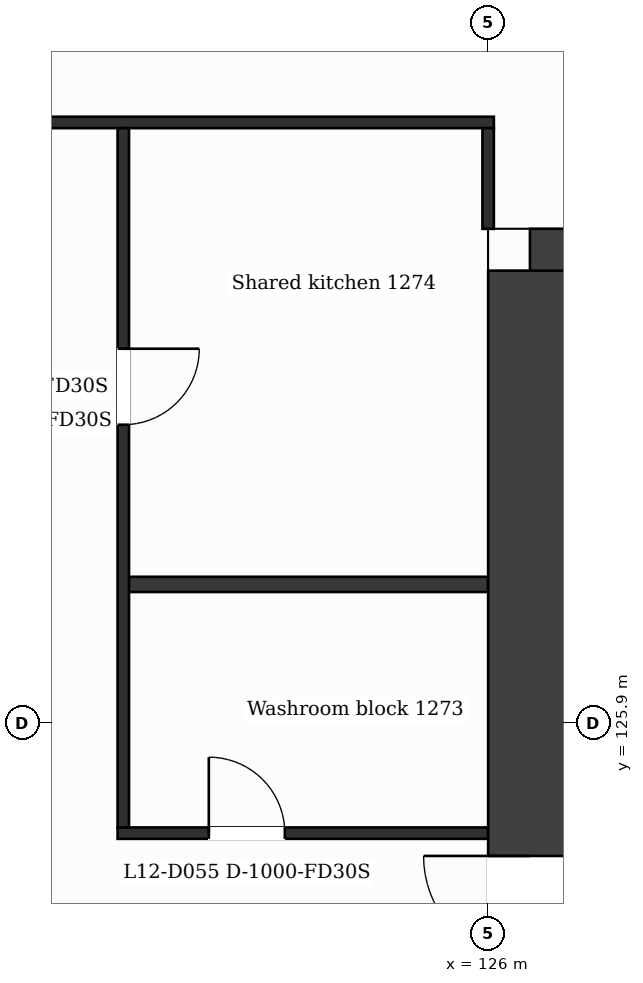
"""IFC4 building model, lengths in metres.
Left out: names, types, materials, properties, quantities, classifications, styles, units other than length and angle.
Written with IfcOpenShell. Run it as: python <this file> out.ifc"""

import sys

from ifc_helpers import new_model, si_unit, direction, frame, frame_2d, origin, place, context, subcontext, project, spatial, rectangle, extrude, element, fill, save


model = new_model("IFC4")
c1 = context("Model", 3, precision=1e-05, world=origin(), true_north=direction((0.0, 1.0)))
c2 = subcontext(c1, "Body", "Model", "MODEL_VIEW")
j1 = project(units=[si_unit("LENGTHUNIT", "METRE"), si_unit("PLANEANGLEUNIT", "RADIAN")], contexts=[c1])
p1 = place(None, origin())
s1 = spatial("IfcSite", under=j1, at=p1, CompositionType="ELEMENT")
p2 = place(p1, origin())
s2 = spatial("IfcBuilding", under=s1, at=p2, CompositionType="ELEMENT")
p3 = place(p2, frame((0.0, 0.0, 60.0)))
s3 = spatial("IfcBuildingStorey", under=s2, at=p3, CompositionType="ELEMENT", Elevation=60.0)
p4 = place(p3, frame((126.55, 131.85, 0.0), z_axis=(0.0, 0.0, 1.0), x_axis=(1.0, 0.0, 0.0)))
e1 = element("IfcWall", 1, at=p4, inside=s3, PredefinedType="SHEAR", context=c2, shape_type="SweptSolid", body=[
    extrude(rectangle(XDim=11.138, YDim=1.1, at=frame_2d((5.569, 0.0))), origin(), (0.0, 0.0, 1.0), 3.5),
])
p5 = place(p4, frame((3.386, 0.0, 0.0)))
e2 = element("IfcOpeningElement", 2, at=p5, cuts=e1, PredefinedType="OPENING", context=c2, shape_type="SweptSolid", body=[
    extrude(rectangle(XDim=1.2, YDim=2.1, at=frame_2d((0.6, 1.05))), frame((0.0, 0.56, 0.0), z_axis=(0.0, -1.0, 0.0), x_axis=(1.0, 0.0, 0.0)), (0.0, 0.0, 1.0), 1.12),
])
p6 = place(p3, frame((126.55, 110.95, 0.0), z_axis=(0.0, 0.0, 1.0), x_axis=(0.0, 1.0, 0.0)))
e3 = element("IfcWall", 3, at=p6, inside=s3, PredefinedType="SHEAR", context=c2, shape_type="SweptSolid", body=[
    extrude(rectangle(XDim=20.9, YDim=1.1, at=frame_2d((10.45, 0.0))), origin(), (0.0, 0.0, 1.0), 3.5),
])
p7 = place(p6, frame((11.8, 0.0, 0.0)))
e4 = element("IfcOpeningElement", 4, at=p7, cuts=e3, PredefinedType="OPENING", context=c2, shape_type="SweptSolid", body=[
    extrude(rectangle(XDim=1.4, YDim=2.1, at=frame_2d((0.7, 1.05))), frame((0.0, 0.56, 0.0), z_axis=(0.0, -1.0, 0.0), x_axis=(1.0, 0.0, 0.0)), (0.0, 0.0, 1.0), 1.12),
])
p8 = place(p3, frame((121.125, 124.45, 0.0), z_axis=(0.0, 0.0, 1.0), x_axis=(1.0, 0.0, 0.0)))
e5 = element("IfcWall", 5, at=p8, inside=s3, PredefinedType="PARTITIONING", context=c2, shape_type="SweptSolid", body=[
    extrude(rectangle(XDim=4.875, YDim=0.15, at=frame_2d((2.438, 0.0))), origin(), (0.0, 0.0, 1.0), 3.18),
])
p9 = place(p8, frame((1.2, 0.0, 0.0)))
e6 = element("IfcOpeningElement", 6, at=p9, cuts=e5, PredefinedType="OPENING", context=c2, shape_type="SweptSolid", body=[
    extrude(rectangle(XDim=1.0, YDim=2.1, at=frame_2d((0.5, 1.05))), frame((0.0, 0.085, 0.0), z_axis=(0.0, -1.0, 0.0), x_axis=(1.0, 0.0, 0.0)), (0.0, 0.0, 1.0), 0.17),
])
p10 = place(p3, frame((121.2, 127.722, 0.0), z_axis=(0.0, 0.0, 1.0), x_axis=(1.0, 0.0, 0.0)))
e7 = element("IfcWall", 7, at=p10, inside=s3, PredefinedType="PARTITIONING", context=c2, shape_type="SweptSolid", body=[
    extrude(rectangle(XDim=4.8, YDim=0.2, at=frame_2d((2.4, 0.0))), origin(), (0.0, 0.0, 1.0), 3.18),
])
p11 = place(p3, frame((100.725, 133.8, 0.0), z_axis=(0.0, 0.0, 1.0), x_axis=(1.0, 0.0, 0.0)))
e8 = element("IfcWall", 8, at=p11, inside=s3, PredefinedType="PARTITIONING", context=c2, shape_type="SweptSolid", body=[
    extrude(rectangle(XDim=25.35, YDim=0.15, at=frame_2d((12.675, 0.0))), origin(), (0.0, 0.0, 1.0), 3.18),
])
p12 = place(p3, frame((121.2, 124.525, 0.0), z_axis=(0.0, 0.0, 1.0), x_axis=(0.0, 1.0, 0.0)))
e9 = element("IfcWall", 9, at=p12, inside=s3, PredefinedType="PARTITIONING", context=c2, shape_type="SweptSolid", body=[
    extrude(rectangle(XDim=9.2, YDim=0.15, at=frame_2d((4.6, 0.0))), origin(), (0.0, 0.0, 1.0), 3.18),
])
p13 = place(p12, frame((5.298, 0.0, 0.0)))
e10 = element("IfcOpeningElement", 10, at=p13, cuts=e9, PredefinedType="OPENING", context=c2, shape_type="SweptSolid", body=[
    extrude(rectangle(XDim=1.0, YDim=2.1, at=frame_2d((0.5, 1.05))), frame((0.0, 0.085, 0.0), z_axis=(0.0, -1.0, 0.0), x_axis=(1.0, 0.0, 0.0)), (0.0, 0.0, 1.0), 0.17),
])
p14 = place(p3, frame((126.0, 132.4, 0.0), z_axis=(0.0, 0.0, 1.0), x_axis=(0.0, 1.0, 0.0)))
e11 = element("IfcWall", 11, at=p14, inside=s3, PredefinedType="PARTITIONING", context=c2, shape_type="SweptSolid", body=[
    extrude(rectangle(XDim=1.325, YDim=0.15, at=frame_2d((0.663, 0.0))), origin(), (0.0, 0.0, 1.0), 3.18),
])
p15 = place(p9, origin())
e12 = element("IfcDoor", 12, at=p15, inside=s3, OperationType="SINGLE_SWING_LEFT", PredefinedType="DOOR", context=c2, shape_type="SweptSolid", body=[
    extrude(rectangle(XDim=1.0, YDim=2.1, at=frame_2d((0.5, 1.05))), frame((0.0, 0.025, 0.0), z_axis=(0.0, -1.0, 0.0), x_axis=(1.0, 0.0, 0.0)), (0.0, 0.0, 1.0), 0.05),
])
fill(e6, e12)
p16 = place(p13, origin())
e13 = element("IfcDoor", 13, at=p16, inside=s3, OperationType="SINGLE_SWING_RIGHT", PredefinedType="DOOR", context=c2, shape_type="SweptSolid", body=[
    extrude(rectangle(XDim=1.0, YDim=2.1, at=frame_2d((0.5, 1.05))), frame((0.0, 0.025, 0.0), z_axis=(0.0, -1.0, 0.0), x_axis=(1.0, 0.0, 0.0)), (0.0, 0.0, 1.0), 0.05),
])
fill(e10, e13)
p17 = place(p7, origin())
e14 = element("IfcDoor", 14, at=p17, inside=s3, OperationType="SINGLE_SWING_RIGHT", PredefinedType="DOOR", context=c2, shape_type="SweptSolid", body=[
    extrude(rectangle(XDim=1.4, YDim=2.1, at=frame_2d((0.7, 1.05))), frame((0.0, 0.025, 0.0), z_axis=(0.0, -1.0, 0.0), x_axis=(1.0, 0.0, 0.0)), (0.0, 0.0, 1.0), 0.05),
])
fill(e4, e14)
save(model, sys.argv[1])
